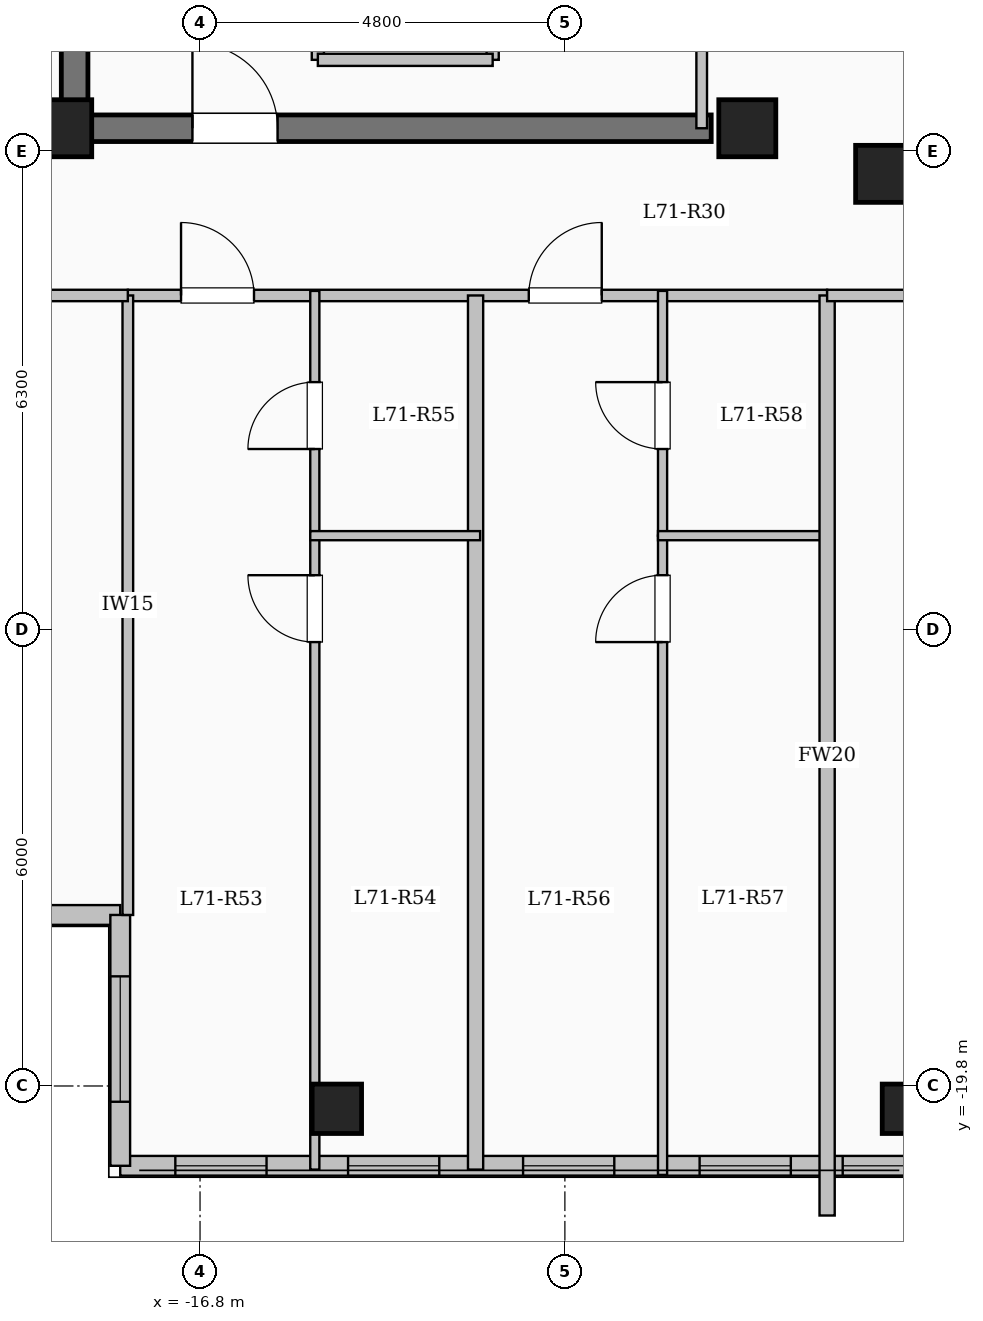
"""IFC4 building model, lengths in metres.
Left out: names, types, materials, properties, quantities, classifications, styles, units other than length and angle.
Written with IfcOpenShell. Run it as: python <this file> out.ifc"""

import sys

from ifc_helpers import new_model, si_unit, direction, frame, frame_2d, origin, origin_2d, place, context, subcontext, project, spatial, rectangle, extrude, element, fill, save


model = new_model("IFC4")
c1 = context("Model", 3, precision=1e-05, world=origin(), true_north=direction((0.0, 1.0)))
c2 = subcontext(c1, "Body", "Model", "MODEL_VIEW")
j1 = project(units=[si_unit("LENGTHUNIT", "METRE"), si_unit("PLANEANGLEUNIT", "RADIAN")], contexts=[c1])
p1 = place(None, origin())
s1 = spatial("IfcSite", under=j1, at=p1, CompositionType="ELEMENT")
p2 = place(p1, origin())
s2 = spatial("IfcBuilding", under=s1, at=p2, CompositionType="ELEMENT")
p3 = place(p2, frame((0.0, 0.0, 261.6)))
s3 = spatial("IfcBuildingStorey", under=s2, at=p3, CompositionType="ELEMENT", Elevation=261.6)
for number, where, z_axis, x_axis in (
    (1, (-7.8, -7.8, 0.0), (0.0, 0.0, 1.0), (1.0, 0.0, 0.0)),
    (2, (-9.6, -7.2, 0.0), (0.0, 0.0, 1.0), (1.0, 0.0, 0.0)),
    (3, (-18.6, -7.2, 0.0), (0.0, 0.0, 1.0), (1.0, 0.0, 0.0)),
):
    element("IfcColumn", number, at=place(p3, frame(where, z_axis=z_axis, x_axis=x_axis)), inside=s3, PredefinedType="COLUMN", context=c2, shape_type="SweptSolid", body=[
        extrude(rectangle(XDim=0.75, YDim=0.75, at=origin_2d()), origin(), (0.0, 0.0, 1.0), 3.35),
    ])
for number, where, z_axis, x_axis in (
    (4, (-15.0, -20.1, 0.0), (0.0, 0.0, 1.0), (1.0, 0.0, 0.0)),
    (5, (-7.5, -20.1, 0.0), (0.0, 0.0, 1.0), (1.0, 0.0, 0.0)),
):
    element("IfcColumn", number, at=place(p3, frame(where, z_axis=z_axis, x_axis=x_axis)), inside=s3, PredefinedType="COLUMN", context=c2, shape_type="SweptSolid", body=[
        extrude(rectangle(XDim=0.65, YDim=0.65, at=origin_2d()), origin(), (0.0, 0.0, 1.0), 3.35),
    ])
p4 = place(p3, frame((-17.85, -17.55, 0.0), z_axis=(0.0, 0.0, 1.0), x_axis=(-1.0, 0.0, 0.0)))
e6 = element("IfcWall", 6, at=p4, inside=s3, PredefinedType="SOLIDWALL", context=c2, shape_type="SweptSolid", body=[
    extrude(rectangle(XDim=4.8, YDim=0.26, at=frame_2d((2.4, 0.0))), origin(), (0.0, 0.0, 1.0), 3.1),
])
p5 = place(p4, frame((1.275, 0.0, 0.9)))
e7 = element("IfcOpeningElement", 7, at=p5, cuts=e6, PredefinedType="OPENING", context=c2, shape_type="SweptSolid", body=[
    extrude(rectangle(XDim=2.2, YDim=1.75, at=frame_2d((1.1, 0.875))), frame((0.0, 0.14, 0.0), z_axis=(0.0, -1.0, 0.0), x_axis=(1.0, 0.0, 0.0)), (0.0, 0.0, 1.0), 0.28),
])
p6 = place(p3, frame((-7.35, -20.85, 0.0), z_axis=(0.0, 0.0, 1.0), x_axis=(-1.0, 0.0, 0.0)))
e8 = element("IfcWall", 8, at=p6, inside=s3, PredefinedType="SOLIDWALL", context=c2, shape_type="SweptSolid", body=[
    extrude(rectangle(XDim=10.5, YDim=0.26, at=frame_2d((5.25, 0.0))), origin(), (0.0, 0.0, 1.0), 3.1),
])
p7 = place(p6, frame((0.145, 0.0, 0.95)))
e9 = element("IfcOpeningElement", 9, at=p7, cuts=e8, PredefinedType="OPENING", context=c2, shape_type="SweptSolid", body=[
    extrude(rectangle(XDim=0.85, YDim=1.5, at=frame_2d((0.425, 0.75))), frame((0.0, 0.14, 0.0), z_axis=(0.0, -1.0, 0.0), x_axis=(1.0, 0.0, 0.0)), (0.0, 0.0, 1.0), 0.28),
])
p8 = place(p6, frame((1.677, 0.0, 0.95)))
e10 = element("IfcOpeningElement", 10, at=p8, cuts=e8, PredefinedType="OPENING", context=c2, shape_type="SweptSolid", body=[
    extrude(rectangle(XDim=1.2, YDim=1.5, at=frame_2d((0.6, 0.75))), frame((0.0, 0.14, 0.0), z_axis=(0.0, -1.0, 0.0), x_axis=(1.0, 0.0, 0.0)), (0.0, 0.0, 1.0), 0.28),
])
p9 = place(p6, frame((4.0, 0.0, 0.95)))
e11 = element("IfcOpeningElement", 11, at=p9, cuts=e8, PredefinedType="OPENING", context=c2, shape_type="SweptSolid", body=[
    extrude(rectangle(XDim=1.2, YDim=1.5, at=frame_2d((0.6, 0.75))), frame((0.0, 0.14, 0.0), z_axis=(0.0, -1.0, 0.0), x_axis=(1.0, 0.0, 0.0)), (0.0, 0.0, 1.0), 0.28),
])
p10 = place(p6, frame((6.302, 0.0, 0.95)))
e12 = element("IfcOpeningElement", 12, at=p10, cuts=e8, PredefinedType="OPENING", context=c2, shape_type="SweptSolid", body=[
    extrude(rectangle(XDim=1.2, YDim=1.5, at=frame_2d((0.6, 0.75))), frame((0.0, 0.14, 0.0), z_axis=(0.0, -1.0, 0.0), x_axis=(1.0, 0.0, 0.0)), (0.0, 0.0, 1.0), 0.28),
])
p11 = place(p6, frame((8.575, 0.0, 0.95)))
e13 = element("IfcOpeningElement", 13, at=p11, cuts=e8, PredefinedType="OPENING", context=c2, shape_type="SweptSolid", body=[
    extrude(rectangle(XDim=1.2, YDim=1.5, at=frame_2d((0.6, 0.75))), frame((0.0, 0.14, 0.0), z_axis=(0.0, -1.0, 0.0), x_axis=(1.0, 0.0, 0.0)), (0.0, 0.0, 1.0), 0.28),
])
p12 = place(p3, frame((-17.85, -20.85, 0.0), z_axis=(0.0, 0.0, 1.0), x_axis=(0.0, 1.0, 0.0)))
e14 = element("IfcWall", 14, at=p12, inside=s3, PredefinedType="SOLIDWALL", context=c2, shape_type="SweptSolid", body=[
    extrude(rectangle(XDim=3.3, YDim=0.26, at=frame_2d((1.65, 0.0))), origin(), (0.0, 0.0, 1.0), 3.1),
])
p13 = place(p12, frame((0.843, 0.0, 0.9)))
e15 = element("IfcOpeningElement", 15, at=p13, cuts=e14, PredefinedType="OPENING", context=c2, shape_type="SweptSolid", body=[
    extrude(rectangle(XDim=1.65, YDim=1.6, at=frame_2d((0.825, 0.8))), frame((0.0, 0.14, 0.0), z_axis=(0.0, -1.0, 0.0), x_axis=(1.0, 0.0, 0.0)), (0.0, 0.0, 1.0), 0.28),
])
p14 = place(p3, frame((-15.25, -6.3, 0.0), z_axis=(0.0, 0.0, 1.0), x_axis=(0.0, 1.0, 0.0)))
e16 = element("IfcWall", 16, at=p14, inside=s3, PredefinedType="SOLIDWALL", context=c2, shape_type="SweptSolid", body=[
    extrude(rectangle(XDim=2.6, YDim=0.16, at=frame_2d((1.3, 0.0))), origin(), (0.0, 0.0, 1.0), 3.1),
])
p15 = place(p14, frame((0.75, 0.0, 0.0)))
e17 = element("IfcOpeningElement", 17, at=p15, cuts=e16, PredefinedType="OPENING", context=c2, shape_type="SweptSolid", body=[
    extrude(rectangle(XDim=1.1, YDim=2.15, at=frame_2d((0.55, 1.075))), frame((0.0, 0.09, 0.0), z_axis=(0.0, -1.0, 0.0), x_axis=(1.0, 0.0, 0.0)), (0.0, 0.0, 1.0), 0.18),
])
p16 = place(p3, frame((-12.95, -6.3, 0.0), z_axis=(0.0, 0.0, 1.0), x_axis=(0.0, 1.0, 0.0)))
e18 = element("IfcWall", 18, at=p16, inside=s3, PredefinedType="SOLIDWALL", context=c2, shape_type="SweptSolid", body=[
    extrude(rectangle(XDim=2.6, YDim=0.16, at=frame_2d((1.3, 0.0))), origin(), (0.0, 0.0, 1.0), 3.1),
])
p17 = place(p3, frame((-15.25, -6.3, 0.0), z_axis=(0.0, 0.0, 1.0), x_axis=(1.0, 0.0, 0.0)))
e19 = element("IfcWall", 19, at=p17, inside=s3, PredefinedType="SOLIDWALL", context=c2, shape_type="SweptSolid", body=[
    extrude(rectangle(XDim=2.3, YDim=0.16, at=frame_2d((1.15, 0.0))), origin(), (0.0, 0.0, 1.0), 3.1),
])
p18 = place(p3, frame((-18.45, -7.375, 0.0), z_axis=(0.0, 0.0, 1.0), x_axis=(0.0, 1.0, 0.0)))
e20 = element("IfcWall", 20, at=p18, inside=s3, PredefinedType="SHEAR", context=c2, shape_type="SweptSolid", body=[
    extrude(rectangle(XDim=14.05, YDim=0.35, at=frame_2d((7.025, 0.0))), origin(), (0.0, 0.0, 1.0), 3.35),
])
p19 = place(p3, frame((-18.625, -7.2, 0.0), z_axis=(0.0, 0.0, 1.0), x_axis=(1.0, 0.0, 0.0)))
e21 = element("IfcWall", 21, at=p19, inside=s3, PredefinedType="SHEAR", context=c2, shape_type="SweptSolid", body=[
    extrude(rectangle(XDim=8.55, YDim=0.35, at=frame_2d((4.275, 0.0))), origin(), (0.0, 0.0, 1.0), 3.35),
])
p20 = place(p19, frame((1.725, 0.0, 0.0)))
e22 = element("IfcOpeningElement", 22, at=p20, cuts=e21, PredefinedType="OPENING", context=c2, shape_type="SweptSolid", body=[
    extrude(rectangle(XDim=1.12, YDim=2.15, at=frame_2d((0.56, 1.075))), frame((0.0, 0.185, 0.0), z_axis=(0.0, -1.0, 0.0), x_axis=(1.0, 0.0, 0.0)), (0.0, 0.0, 1.0), 0.37),
])
p21 = place(p3, frame((-10.2, -7.2, 0.0), z_axis=(0.0, 0.0, 1.0), x_axis=(0.0, 1.0, 0.0)))
e23 = element("IfcWall", 23, at=p21, inside=s3, PredefinedType="PARTITIONING", context=c2, shape_type="SweptSolid", body=[
    extrude(rectangle(XDim=9.12, YDim=0.14, at=frame_2d((4.56, 0.0))), origin(), (0.0, 0.0, 1.0), 3.1),
])
p22 = place(p21, frame((1.6, 0.0, 0.0)))
e24 = element("IfcOpeningElement", 24, at=p22, cuts=e23, PredefinedType="OPENING", context=c2, shape_type="SweptSolid", body=[
    extrude(rectangle(XDim=0.95, YDim=2.12, at=frame_2d((0.475, 1.06))), frame((0.0, 0.08, 0.0), z_axis=(0.0, -1.0, 0.0), x_axis=(1.0, 0.0, 0.0)), (0.0, 0.0, 1.0), 0.16),
])
p23 = place(p21, frame((5.8, 0.0, 0.0)))
e25 = element("IfcOpeningElement", 25, at=p23, cuts=e23, PredefinedType="OPENING", context=c2, shape_type="SweptSolid", body=[
    extrude(rectangle(XDim=0.95, YDim=2.12, at=frame_2d((0.475, 1.06))), frame((0.0, 0.08, 0.0), z_axis=(0.0, -1.0, 0.0), x_axis=(1.0, 0.0, 0.0)), (0.0, 0.0, 1.0), 0.16),
])
p24 = place(p3, frame((-17.75, -9.4, 0.0), z_axis=(0.0, 0.0, 1.0), x_axis=(1.0, 0.0, 0.0)))
e26 = element("IfcWall", 26, at=p24, inside=s3, PredefinedType="PARTITIONING", context=c2, shape_type="SweptSolid", body=[
    extrude(rectangle(XDim=9.2, YDim=0.15, at=frame_2d((4.6, 0.0))), origin(), (0.0, 0.0, 1.0), 3.1),
])
p25 = place(p24, frame((0.7, 0.0, 0.0)))
e27 = element("IfcOpeningElement", 27, at=p25, cuts=e26, PredefinedType="OPENING", context=c2, shape_type="SweptSolid", body=[
    extrude(rectangle(XDim=0.96, YDim=2.15, at=frame_2d((0.48, 1.075))), frame((0.0, 0.085, 0.0), z_axis=(0.0, -1.0, 0.0), x_axis=(1.0, 0.0, 0.0)), (0.0, 0.0, 1.0), 0.17),
])
p26 = place(p24, frame((5.275, 0.0, 0.0)))
e28 = element("IfcOpeningElement", 28, at=p26, cuts=e26, PredefinedType="OPENING", context=c2, shape_type="SweptSolid", body=[
    extrude(rectangle(XDim=0.96, YDim=2.15, at=frame_2d((0.48, 1.075))), frame((0.0, 0.085, 0.0), z_axis=(0.0, -1.0, 0.0), x_axis=(1.0, 0.0, 0.0)), (0.0, 0.0, 1.0), 0.17),
])
p27 = place(p3, frame((-13.175, -20.9, 0.0), z_axis=(0.0, 0.0, 1.0), x_axis=(0.0, 1.0, 0.0)))
e29 = element("IfcWall", 29, at=p27, inside=s3, PredefinedType="SOLIDWALL", context=c2, shape_type="SweptSolid", body=[
    extrude(rectangle(XDim=11.5, YDim=0.2, at=frame_2d((5.75, 0.0))), origin(), (0.0, 0.0, 1.0), 3.1),
])
p28 = place(p3, frame((-15.29, -20.9, 0.0), z_axis=(0.0, 0.0, 1.0), x_axis=(0.0, 1.0, 0.0)))
e30 = element("IfcWall", 30, at=p28, inside=s3, PredefinedType="PARTITIONING", context=c2, shape_type="SweptSolid", body=[
    extrude(rectangle(XDim=8.34, YDim=0.12, at=frame_2d((4.17, 0.0))), origin(), (0.0, 0.0, 1.0), 2.685),
])
p29 = place(p28, frame((6.94, 0.0, 0.0)))
e31 = element("IfcOpeningElement", 31, at=p29, cuts=e30, PredefinedType="OPENING", context=c2, shape_type="SweptSolid", body=[
    extrude(rectangle(XDim=0.88, YDim=2.1, at=frame_2d((0.44, 1.05))), frame((0.0, 0.07, 0.0), z_axis=(0.0, -1.0, 0.0), x_axis=(1.0, 0.0, 0.0)), (0.0, 0.0, 1.0), 0.14),
])
p30 = place(p3, frame((-15.29, -12.56, 0.0), z_axis=(0.0, 0.0, 1.0), x_axis=(0.0, 1.0, 0.0)))
e32 = element("IfcWall", 32, at=p30, inside=s3, PredefinedType="PARTITIONING", context=c2, shape_type="SweptSolid", body=[
    extrude(rectangle(XDim=3.22, YDim=0.12, at=frame_2d((1.61, 0.0))), origin(), (0.0, 0.0, 1.0), 2.685),
])
p31 = place(p30, frame((1.14, 0.0, 0.0)))
e33 = element("IfcOpeningElement", 33, at=p31, cuts=e32, PredefinedType="OPENING", context=c2, shape_type="SweptSolid", body=[
    extrude(rectangle(XDim=0.88, YDim=2.1, at=frame_2d((0.44, 1.05))), frame((0.0, 0.07, 0.0), z_axis=(0.0, -1.0, 0.0), x_axis=(1.0, 0.0, 0.0)), (0.0, 0.0, 1.0), 0.14),
])
p32 = place(p3, frame((-15.35, -12.56, 0.0), z_axis=(0.0, 0.0, 1.0), x_axis=(1.0, 0.0, 0.0)))
e34 = element("IfcWall", 34, at=p32, inside=s3, PredefinedType="PARTITIONING", context=c2, shape_type="SweptSolid", body=[
    extrude(rectangle(XDim=2.235, YDim=0.12, at=frame_2d((1.118, 0.0))), origin(), (0.0, 0.0, 1.0), 2.785),
])
p33 = place(p3, frame((-10.715, -20.97, 0.0), z_axis=(0.0, 0.0, 1.0), x_axis=(0.0, 1.0, 0.0)))
e35 = element("IfcWall", 35, at=p33, inside=s3, PredefinedType="PARTITIONING", context=c2, shape_type="SweptSolid", body=[
    extrude(rectangle(XDim=8.41, YDim=0.12, at=frame_2d((4.205, 0.0))), origin(), (0.0, 0.0, 1.0), 3.1),
])
p34 = place(p33, frame((7.01, 0.0, 0.0)))
e36 = element("IfcOpeningElement", 36, at=p34, cuts=e35, PredefinedType="OPENING", context=c2, shape_type="SweptSolid", body=[
    extrude(rectangle(XDim=0.88, YDim=2.1, at=frame_2d((0.44, 1.05))), frame((0.0, 0.07, 0.0), z_axis=(0.0, -1.0, 0.0), x_axis=(1.0, 0.0, 0.0)), (0.0, 0.0, 1.0), 0.14),
])
p35 = place(p3, frame((-10.715, -12.56, 0.0), z_axis=(0.0, 0.0, 1.0), x_axis=(0.0, 1.0, 0.0)))
e37 = element("IfcWall", 37, at=p35, inside=s3, PredefinedType="PARTITIONING", context=c2, shape_type="SweptSolid", body=[
    extrude(rectangle(XDim=3.22, YDim=0.12, at=frame_2d((1.61, 0.0))), origin(), (0.0, 0.0, 1.0), 3.1),
])
p36 = place(p35, frame((1.14, 0.0, 0.0)))
e38 = element("IfcOpeningElement", 38, at=p36, cuts=e37, PredefinedType="OPENING", context=c2, shape_type="SweptSolid", body=[
    extrude(rectangle(XDim=0.88, YDim=2.1, at=frame_2d((0.44, 1.05))), frame((0.0, 0.07, 0.0), z_axis=(0.0, -1.0, 0.0), x_axis=(1.0, 0.0, 0.0)), (0.0, 0.0, 1.0), 0.14),
])
p37 = place(p3, frame((-10.775, -12.56, 0.0), z_axis=(0.0, 0.0, 1.0), x_axis=(1.0, 0.0, 0.0)))
e39 = element("IfcWall", 39, at=p37, inside=s3, PredefinedType="PARTITIONING", context=c2, shape_type="SweptSolid", body=[
    extrude(rectangle(XDim=2.235, YDim=0.12, at=frame_2d((1.117, 0.0))), origin(), (0.0, 0.0, 1.0), 2.785),
])
p38 = place(p3, frame((-8.55, -21.504, 0.0), z_axis=(0.0, 0.0, 1.0), x_axis=(0.0, 1.0, 0.0)))
e40 = element("IfcWall", 40, at=p38, inside=s3, PredefinedType="SOLIDWALL", context=c2, shape_type="SweptSolid", body=[
    extrude(rectangle(XDim=12.104, YDim=0.2, at=frame_2d((6.052, 0.0))), origin(), (0.0, 0.0, 1.0), 3.1),
])
p39 = place(p3, frame((-8.55, -9.4, 0.0), z_axis=(0.0, 0.0, 1.0), x_axis=(1.0, 0.0, 0.0)))
e41 = element("IfcWall", 41, at=p39, inside=s3, PredefinedType="PARTITIONING", context=c2, shape_type="SweptSolid", body=[
    extrude(rectangle(XDim=17.1, YDim=0.15, at=frame_2d((8.55, 0.0))), origin(), (0.0, 0.0, 1.0), 3.1),
])
p40 = place(p39, frame((1.75, 0.0, 0.0)))
e42 = element("IfcOpeningElement", 42, at=p40, cuts=e41, PredefinedType="OPENING", context=c2, shape_type="SweptSolid", body=[
    extrude(rectangle(XDim=0.96, YDim=2.15, at=frame_2d((0.48, 1.075))), frame((0.0, 0.085, 0.0), z_axis=(0.0, -1.0, 0.0), x_axis=(1.0, 0.0, 0.0)), (0.0, 0.0, 1.0), 0.17),
])
p41 = place(p3, frame((-22.68, -7.25, 0.0), z_axis=(0.0, 0.0, 1.0), x_axis=(1.0, 0.0, 0.0)))
e43 = element("IfcWall", 43, at=p41, inside=s3, PredefinedType="PARTITIONING", context=c2, shape_type="SweptSolid", body=[
    extrude(rectangle(XDim=4.23, YDim=0.15, at=frame_2d((2.115, 0.0))), origin(), (0.0, 0.0, 1.0), 3.1),
])
p42 = place(p41, frame((1.63, 0.0, 0.0)))
e44 = element("IfcOpeningElement", 44, at=p42, cuts=e43, PredefinedType="OPENING", context=c2, shape_type="SweptSolid", body=[
    extrude(rectangle(XDim=1.08, YDim=2.15, at=frame_2d((0.54, 1.075))), frame((0.0, 0.085, 0.0), z_axis=(0.0, -1.0, 0.0), x_axis=(1.0, 0.0, 0.0)), (0.0, 0.0, 1.0), 0.17),
])
p43 = place(p3, frame((-17.75, -17.55, 0.0), z_axis=(0.0, 0.0, 1.0), x_axis=(0.0, 1.0, 0.0)))
e45 = element("IfcWall", 45, at=p43, inside=s3, PredefinedType="PARTITIONING", context=c2, shape_type="SweptSolid", body=[
    extrude(rectangle(XDim=8.15, YDim=0.14, at=frame_2d((4.075, 0.0))), origin(), (0.0, 0.0, 1.0), 3.1),
])
p44 = place(p3, frame((-22.68, -9.4, 0.0), z_axis=(0.0, 0.0, 1.0), x_axis=(1.0, 0.0, 0.0)))
e46 = element("IfcWall", 46, at=p44, inside=s3, PredefinedType="PARTITIONING", context=c2, shape_type="SweptSolid", body=[
    extrude(rectangle(XDim=4.93, YDim=0.15, at=frame_2d((2.465, 0.0))), origin(), (0.0, 0.0, 1.0), 3.1),
])
p45 = place(p44, frame((1.99, 0.0, 0.0)))
e47 = element("IfcOpeningElement", 47, at=p45, cuts=e46, PredefinedType="OPENING", context=c2, shape_type="SweptSolid", body=[
    extrude(rectangle(XDim=0.95, YDim=2.15, at=frame_2d((0.475, 1.075))), frame((0.0, 0.085, 0.0), z_axis=(0.0, -1.0, 0.0), x_axis=(1.0, 0.0, 0.0)), (0.0, 0.0, 1.0), 0.17),
])
p46 = place(p7, origin())
e48 = element("IfcWindow", 48, at=p46, inside=s3, PartitioningType="SINGLE_PANEL", PredefinedType="WINDOW", context=c2, shape_type="SweptSolid", body=[
    extrude(rectangle(XDim=0.85, YDim=1.5, at=frame_2d((0.425, 0.75))), frame((0.0, 0.03, 0.0), z_axis=(0.0, -1.0, 0.0), x_axis=(1.0, 0.0, 0.0)), (0.0, 0.0, 1.0), 0.06),
])
fill(e9, e48)
p47 = place(p8, origin())
e49 = element("IfcWindow", 49, at=p47, inside=s3, PartitioningType="SINGLE_PANEL", PredefinedType="WINDOW", context=c2, shape_type="SweptSolid", body=[
    extrude(rectangle(XDim=1.2, YDim=1.5, at=frame_2d((0.6, 0.75))), frame((0.0, 0.03, 0.0), z_axis=(0.0, -1.0, 0.0), x_axis=(1.0, 0.0, 0.0)), (0.0, 0.0, 1.0), 0.06),
])
fill(e10, e49)
p48 = place(p9, origin())
e50 = element("IfcWindow", 50, at=p48, inside=s3, PartitioningType="SINGLE_PANEL", PredefinedType="WINDOW", context=c2, shape_type="SweptSolid", body=[
    extrude(rectangle(XDim=1.2, YDim=1.5, at=frame_2d((0.6, 0.75))), frame((0.0, 0.03, 0.0), z_axis=(0.0, -1.0, 0.0), x_axis=(1.0, 0.0, 0.0)), (0.0, 0.0, 1.0), 0.06),
])
fill(e11, e50)
p49 = place(p10, origin())
e51 = element("IfcWindow", 51, at=p49, inside=s3, PartitioningType="SINGLE_PANEL", PredefinedType="WINDOW", context=c2, shape_type="SweptSolid", body=[
    extrude(rectangle(XDim=1.2, YDim=1.5, at=frame_2d((0.6, 0.75))), frame((0.0, 0.03, 0.0), z_axis=(0.0, -1.0, 0.0), x_axis=(1.0, 0.0, 0.0)), (0.0, 0.0, 1.0), 0.06),
])
fill(e12, e51)
p50 = place(p11, origin())
e52 = element("IfcWindow", 52, at=p50, inside=s3, PartitioningType="SINGLE_PANEL", PredefinedType="WINDOW", context=c2, shape_type="SweptSolid", body=[
    extrude(rectangle(XDim=1.2, YDim=1.5, at=frame_2d((0.6, 0.75))), frame((0.0, 0.03, 0.0), z_axis=(0.0, -1.0, 0.0), x_axis=(1.0, 0.0, 0.0)), (0.0, 0.0, 1.0), 0.06),
])
fill(e13, e52)
p51 = place(p13, origin())
e53 = element("IfcWindow", 53, at=p51, inside=s3, PartitioningType="SINGLE_PANEL", PredefinedType="WINDOW", context=c2, shape_type="SweptSolid", body=[
    extrude(rectangle(XDim=1.65, YDim=1.6, at=frame_2d((0.825, 0.8))), frame((0.0, 0.03, 0.0), z_axis=(0.0, -1.0, 0.0), x_axis=(1.0, 0.0, 0.0)), (0.0, 0.0, 1.0), 0.06),
])
fill(e15, e53)
p52 = place(p20, origin())
e54 = element("IfcDoor", 54, at=p52, inside=s3, OperationType="SINGLE_SWING_LEFT", PredefinedType="DOOR", context=c2, shape_type="SweptSolid", body=[
    extrude(rectangle(XDim=1.12, YDim=2.15, at=frame_2d((0.56, 1.075))), frame((0.0, 0.025, 0.0), z_axis=(0.0, -1.0, 0.0), x_axis=(1.0, 0.0, 0.0)), (0.0, 0.0, 1.0), 0.05),
])
fill(e22, e54)
p53 = place(p25, origin())
e55 = element("IfcDoor", 55, at=p53, inside=s3, OperationType="SINGLE_SWING_LEFT", PredefinedType="DOOR", context=c2, shape_type="SweptSolid", body=[
    extrude(rectangle(XDim=0.96, YDim=2.15, at=frame_2d((0.48, 1.075))), frame((0.0, 0.025, 0.0), z_axis=(0.0, -1.0, 0.0), x_axis=(1.0, 0.0, 0.0)), (0.0, 0.0, 1.0), 0.05),
])
fill(e27, e55)
p54 = place(p29, origin())
e56 = element("IfcDoor", 56, at=p54, inside=s3, OperationType="SINGLE_SWING_RIGHT", PredefinedType="DOOR", context=c2, shape_type="SweptSolid", body=[
    extrude(rectangle(XDim=0.88, YDim=2.1, at=frame_2d((0.44, 1.05))), frame((0.0, 0.025, 0.0), z_axis=(0.0, -1.0, 0.0), x_axis=(1.0, 0.0, 0.0)), (0.0, 0.0, 1.0), 0.05),
])
fill(e31, e56)
p55 = place(p31, origin())
e57 = element("IfcDoor", 57, at=p55, inside=s3, OperationType="SINGLE_SWING_LEFT", PredefinedType="DOOR", context=c2, shape_type="SweptSolid", body=[
    extrude(rectangle(XDim=0.88, YDim=2.1, at=frame_2d((0.44, 1.05))), frame((0.0, 0.025, 0.0), z_axis=(0.0, -1.0, 0.0), x_axis=(1.0, 0.0, 0.0)), (0.0, 0.0, 1.0), 0.05),
])
fill(e33, e57)
p56 = place(p26, origin())
e58 = element("IfcDoor", 58, at=p56, inside=s3, OperationType="SINGLE_SWING_RIGHT", PredefinedType="DOOR", context=c2, shape_type="SweptSolid", body=[
    extrude(rectangle(XDim=0.96, YDim=2.15, at=frame_2d((0.48, 1.075))), frame((0.0, 0.025, 0.0), z_axis=(0.0, -1.0, 0.0), x_axis=(1.0, 0.0, 0.0)), (0.0, 0.0, 1.0), 0.05),
])
fill(e28, e58)
p57 = place(p34, origin())
e59 = element("IfcDoor", 59, at=p57, inside=s3, OperationType="SINGLE_SWING_LEFT", PredefinedType="DOOR", context=c2, shape_type="SweptSolid", body=[
    extrude(rectangle(XDim=0.88, YDim=2.1, at=frame_2d((0.44, 1.05))), frame((0.0, 0.025, 0.0), z_axis=(0.0, -1.0, 0.0), x_axis=(1.0, 0.0, 0.0)), (0.0, 0.0, 1.0), 0.05),
])
fill(e36, e59)
p58 = place(p36, origin())
e60 = element("IfcDoor", 60, at=p58, inside=s3, OperationType="SINGLE_SWING_RIGHT", PredefinedType="DOOR", context=c2, shape_type="SweptSolid", body=[
    extrude(rectangle(XDim=0.88, YDim=2.1, at=frame_2d((0.44, 1.05))), frame((0.0, 0.025, 0.0), z_axis=(0.0, -1.0, 0.0), x_axis=(1.0, 0.0, 0.0)), (0.0, 0.0, 1.0), 0.05),
])
fill(e38, e60)
save(model, sys.argv[1])
